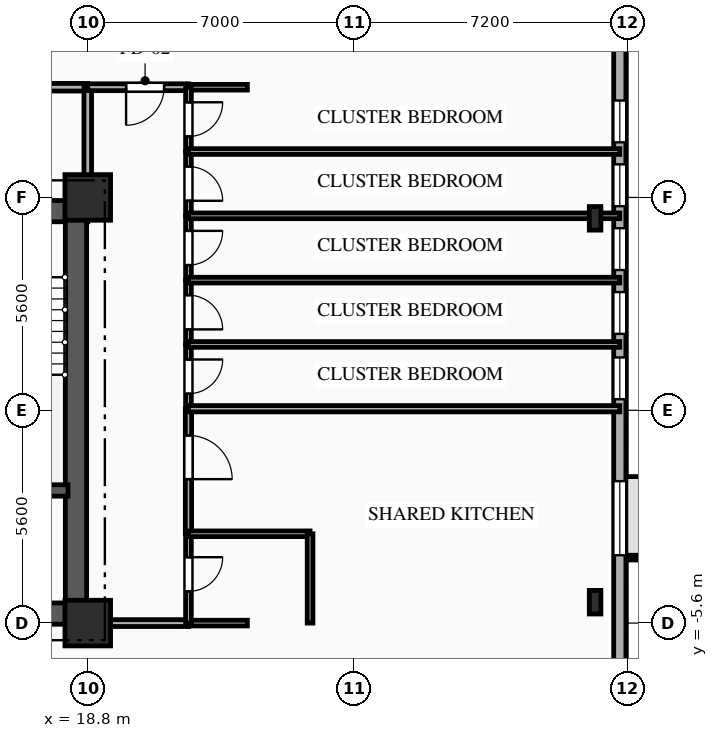
"""IFC4 building model, lengths in metres.
Left out: names, types, materials, properties, quantities, classifications, styles, units other than length and angle.
Written with IfcOpenShell. Run it as: python <this file> out.ifc"""

import sys

from ifc_helpers import new_model, si_unit, direction, frame, frame_2d, origin, origin_2d, place, context, subcontext, project, spatial, rectangle, i_section, extrude, element, fill, save


model = new_model("IFC4")
c1 = context("Model", 3, precision=1e-05, world=origin(), true_north=direction((0.0, 1.0)))
c2 = subcontext(c1, "Body", "Model", "MODEL_VIEW")
j1 = project(units=[si_unit("LENGTHUNIT", "METRE"), si_unit("PLANEANGLEUNIT", "RADIAN")], contexts=[c1])
p1 = place(None, origin())
s1 = spatial("IfcSite", under=j1, at=p1, CompositionType="ELEMENT")
p2 = place(p1, origin())
s2 = spatial("IfcBuilding", under=s1, at=p2, CompositionType="ELEMENT")
p3 = place(p2, frame((0.0, 0.0, 57.15)))
s3 = spatial("IfcBuildingStorey", under=s2, at=p3, CompositionType="ELEMENT", Elevation=57.15)
for number, where, z_axis, x_axis in (
    (1, (18.8, -5.6, 0.0), (0.0, 0.0, 1.0), (1.0, 0.0, 0.0)),
    (2, (18.8, 5.6, 0.0), (0.0, 0.0, 1.0), (1.0, 0.0, 0.0)),
):
    element("IfcColumn", number, at=place(p3, frame(where, z_axis=z_axis, x_axis=x_axis)), inside=s3, PredefinedType="COLUMN", context=c2, shape_type="SweptSolid", body=[
        extrude(rectangle(XDim=1.2, YDim=1.2, at=origin_2d()), origin(), (0.0, 0.0, 1.0), 3.35),
    ])
for number, where, z_axis, x_axis in (
    (3, (32.15, -5.05, 0.0), (0.0, 0.0, 1.0), (1.0, 0.0, 0.0)),
    (4, (32.15, 5.05, 0.0), (0.0, 0.0, 1.0), (1.0, 0.0, 0.0)),
):
    element("IfcColumn", number, at=place(p3, frame(where, z_axis=z_axis, x_axis=x_axis)), inside=s3, PredefinedType="COLUMN", context=c2, shape_type="SweptSolid", body=[
        extrude(i_section(OverallWidth=0.305, OverallDepth=0.62, WebThickness=0.021, FlangeThickness=0.04, FilletRadius=0.027, at=origin_2d()), origin(), (0.0, 0.0, 1.0), 3.35),
    ])
p4 = place(p3, frame((32.8, 15.8, 0.0), z_axis=(0.0, 0.0, 1.0), x_axis=(0.0, -1.0, 0.0)))
e5 = element("IfcWall", 5, at=p4, inside=s3, PredefinedType="SOLIDWALL", context=c2, shape_type="SweptSolid", body=[
    extrude(rectangle(XDim=31.6, YDim=0.32, at=frame_2d((15.8, 0.0))), origin(), (0.0, 0.0, 1.0), 3.035),
])
p5 = place(p4, frame((7.65, 0.0, 0.85)))
e6 = element("IfcOpeningElement", 6, at=p5, cuts=e5, PredefinedType="OPENING", context=c2, shape_type="SweptSolid", body=[
    extrude(rectangle(XDim=1.1, YDim=1.85, at=frame_2d((0.55, 0.925))), frame((0.0, 0.17, 0.0), z_axis=(0.0, -1.0, 0.0), x_axis=(1.0, 0.0, 0.0)), (0.0, 0.0, 1.0), 0.34),
])
p6 = place(p4, frame((9.33, 0.0, 0.85)))
e7 = element("IfcOpeningElement", 7, at=p6, cuts=e5, PredefinedType="OPENING", context=c2, shape_type="SweptSolid", body=[
    extrude(rectangle(XDim=1.1, YDim=1.85, at=frame_2d((0.55, 0.925))), frame((0.0, 0.17, 0.0), z_axis=(0.0, -1.0, 0.0), x_axis=(1.0, 0.0, 0.0)), (0.0, 0.0, 1.0), 0.34),
])
p7 = place(p4, frame((11.01, 0.0, 0.85)))
e8 = element("IfcOpeningElement", 8, at=p7, cuts=e5, PredefinedType="OPENING", context=c2, shape_type="SweptSolid", body=[
    extrude(rectangle(XDim=1.1, YDim=1.85, at=frame_2d((0.55, 0.925))), frame((0.0, 0.17, 0.0), z_axis=(0.0, -1.0, 0.0), x_axis=(1.0, 0.0, 0.0)), (0.0, 0.0, 1.0), 0.34),
])
p8 = place(p4, frame((12.69, 0.0, 0.85)))
e9 = element("IfcOpeningElement", 9, at=p8, cuts=e5, PredefinedType="OPENING", context=c2, shape_type="SweptSolid", body=[
    extrude(rectangle(XDim=1.1, YDim=1.85, at=frame_2d((0.55, 0.925))), frame((0.0, 0.17, 0.0), z_axis=(0.0, -1.0, 0.0), x_axis=(1.0, 0.0, 0.0)), (0.0, 0.0, 1.0), 0.34),
])
p9 = place(p4, frame((14.41, 0.0, 0.85)))
e10 = element("IfcOpeningElement", 10, at=p9, cuts=e5, PredefinedType="OPENING", context=c2, shape_type="SweptSolid", body=[
    extrude(rectangle(XDim=1.1, YDim=1.85, at=frame_2d((0.55, 0.925))), frame((0.0, 0.17, 0.0), z_axis=(0.0, -1.0, 0.0), x_axis=(1.0, 0.0, 0.0)), (0.0, 0.0, 1.0), 0.34),
])
p10 = place(p4, frame((17.665, 0.0, 0.85)))
e11 = element("IfcOpeningElement", 11, at=p10, cuts=e5, PredefinedType="OPENING", context=c2, shape_type="SweptSolid", body=[
    extrude(rectangle(XDim=1.95, YDim=1.85, at=frame_2d((0.975, 0.925))), frame((0.0, 0.17, 0.0), z_axis=(0.0, -1.0, 0.0), x_axis=(1.0, 0.0, 0.0)), (0.0, 0.0, 1.0), 0.34),
])
p11 = place(p3, frame((9.2, 5.24, 0.0), z_axis=(0.0, 0.0, 1.0), x_axis=(1.0, 0.0, 0.0)))
e12 = element("IfcWall", 12, at=p11, inside=s3, PredefinedType="SHEAR", context=c2, shape_type="SweptSolid", body=[
    extrude(rectangle(XDim=9.6, YDim=0.56, at=frame_2d((4.8, 0.0))), origin(), (0.0, 0.0, 1.0), 3.035),
])
p12 = place(p11, frame((6.95, 0.0, 0.0)))
e13 = element("IfcOpeningElement", 13, at=p12, cuts=e12, PredefinedType="OPENING", context=c2, shape_type="SweptSolid", body=[
    extrude(rectangle(XDim=1.1, YDim=2.15, at=frame_2d((0.55, 1.075))), frame((0.0, 0.29, 0.0), z_axis=(0.0, -1.0, 0.0), x_axis=(1.0, 0.0, 0.0)), (0.0, 0.0, 1.0), 0.58),
])
p13 = place(p11, frame((3.775, 0.0, 0.0)))
e14 = element("IfcOpeningElement", 14, at=p13, cuts=e12, PredefinedType="OPENING", context=c2, shape_type="SweptSolid", body=[
    extrude(rectangle(XDim=1.05, YDim=2.1, at=frame_2d((0.525, 1.05))), frame((0.0, 0.29, 0.0), z_axis=(0.0, -1.0, 0.0), x_axis=(1.0, 0.0, 0.0)), (0.0, 0.0, 1.0), 0.58),
])
p14 = place(p3, frame((9.2, -5.35, 0.0), z_axis=(0.0, 0.0, 1.0), x_axis=(1.0, 0.0, 0.0)))
e15 = element("IfcWall", 15, at=p14, inside=s3, PredefinedType="SHEAR", context=c2, shape_type="SweptSolid", body=[
    extrude(rectangle(XDim=9.6, YDim=0.56, at=frame_2d((4.8, 0.0))), origin(), (0.0, 0.0, 1.0), 3.035),
])
p15 = place(p14, frame((7.65, 0.0, 0.0)))
e16 = element("IfcOpeningElement", 16, at=p15, cuts=e15, PredefinedType="OPENING", context=c2, shape_type="SweptSolid", body=[
    extrude(rectangle(XDim=0.9, YDim=2.1, at=frame_2d((0.45, 1.05))), frame((0.0, 0.29, 0.0), z_axis=(0.0, -1.0, 0.0), x_axis=(1.0, 0.0, 0.0)), (0.0, 0.0, 1.0), 0.58),
])
p16 = place(p3, frame((18.49, -5.05, 0.0), z_axis=(0.0, 0.0, 1.0), x_axis=(0.0, 1.0, 0.0)))
e17 = element("IfcWall", 17, at=p16, inside=s3, PredefinedType="SHEAR", context=c2, shape_type="SweptSolid", body=[
    extrude(rectangle(XDim=10.1, YDim=0.56, at=frame_2d((5.05, 0.0))), origin(), (0.0, 0.0, 1.0), 3.035),
])
p17 = place(p3, frame((15.1, -2.11, 0.0), z_axis=(0.0, 0.0, 1.0), x_axis=(1.0, 0.0, 0.0)))
e18 = element("IfcWall", 18, at=p17, inside=s3, PredefinedType="SHEAR", context=c2, shape_type="SweptSolid", body=[
    extrude(rectangle(XDim=3.18, YDim=0.3, at=frame_2d((1.59, 0.0))), origin(), (0.0, 0.0, 1.0), 3.035),
])
p18 = place(p3, frame((18.8, 8.5, 0.0), z_axis=(0.0, 0.0, 1.0), x_axis=(-1.0, 0.0, 0.0)))
e19 = element("IfcWall", 19, at=p18, inside=s3, PredefinedType="PARTITIONING", context=c2, shape_type="SweptSolid", body=[
    extrude(rectangle(XDim=6.8, YDim=0.2, at=frame_2d((3.4, 0.0))), origin(), (0.0, 0.0, 1.0), 3.035),
])
p19 = place(p18, frame((3.985, 0.0, 0.0)))
e20 = element("IfcOpeningElement", 20, at=p19, cuts=e19, PredefinedType="OPENING", context=c2, shape_type="SweptSolid", body=[
    extrude(rectangle(XDim=1.1, YDim=2.15, at=frame_2d((0.55, 1.075))), frame((0.0, 0.11, 0.0), z_axis=(0.0, -1.0, 0.0), x_axis=(1.0, 0.0, 0.0)), (0.0, 0.0, 1.0), 0.22),
])
p20 = place(p3, frame((18.8, 5.6, 0.0), z_axis=(0.0, 0.0, 1.0), x_axis=(0.0, 1.0, 0.0)))
e21 = element("IfcWall", 21, at=p20, inside=s3, PredefinedType="PARTITIONING", context=c2, shape_type="SweptSolid", body=[
    extrude(rectangle(XDim=2.9, YDim=0.2, at=frame_2d((1.45, 0.0))), origin(), (0.0, 0.0, 1.0), 2.52),
])
p21 = place(p3, frame((21.45, 8.5, 0.0), z_axis=(0.0, 0.0, 1.0), x_axis=(-1.0, 0.0, 0.0)))
e22 = element("IfcWall", 22, at=p21, inside=s3, PredefinedType="PARTITIONING", context=c2, shape_type="SweptSolid", body=[
    extrude(rectangle(XDim=2.65, YDim=0.18, at=frame_2d((1.325, 0.0))), origin(), (0.0, 0.0, 1.0), 3.035),
])
p22 = place(p21, frame((0.641, 0.0, 0.0)))
e23 = element("IfcOpeningElement", 23, at=p22, cuts=e22, PredefinedType="OPENING", context=c2, shape_type="SweptSolid", body=[
    extrude(rectangle(XDim=1.0, YDim=2.15, at=frame_2d((0.5, 1.075))), frame((0.0, 0.1, 0.0), z_axis=(0.0, -1.0, 0.0), x_axis=(1.0, 0.0, 0.0)), (0.0, 0.0, 1.0), 0.2),
])
p23 = place(p3, frame((23.0, 8.5, 0.0), z_axis=(0.0, 0.0, 1.0), x_axis=(-1.0, 0.0, 0.0)))
e24 = element("IfcWall", 24, at=p23, inside=s3, PredefinedType="PARTITIONING", context=c2, shape_type="SweptSolid", body=[
    extrude(rectangle(XDim=1.55, YDim=0.15, at=frame_2d((0.775, 0.0))), origin(), (0.0, 0.0, 1.0), 3.035),
])
p24 = place(p3, frame((18.8, -5.6, 0.0), z_axis=(0.0, 0.0, 1.0), x_axis=(1.0, 0.0, 0.0)))
e25 = element("IfcWall", 25, at=p24, inside=s3, PredefinedType="PARTITIONING", context=c2, shape_type="SweptSolid", body=[
    extrude(rectangle(XDim=2.65, YDim=0.18, at=frame_2d((1.325, 0.0))), origin(), (0.0, 0.0, 1.0), 3.035),
])
p25 = place(p3, frame((21.45, -5.6, 0.0), z_axis=(0.0, 0.0, 1.0), x_axis=(1.0, 0.0, 0.0)))
e26 = element("IfcWall", 26, at=p25, inside=s3, PredefinedType="PLUMBINGWALL", context=c2, shape_type="SweptSolid", body=[
    extrude(rectangle(XDim=1.55, YDim=0.15, at=frame_2d((0.775, 0.0))), origin(), (0.0, 0.0, 1.0), 3.035),
])
p26 = place(p3, frame((21.45, -3.25, 0.0), z_axis=(0.0, 0.0, 1.0), x_axis=(0.0, -1.0, 0.0)))
e27 = element("IfcWall", 27, at=p26, inside=s3, PredefinedType="PLUMBINGWALL", context=c2, shape_type="SweptSolid", body=[
    extrude(rectangle(XDim=2.35, YDim=0.15, at=frame_2d((1.175, 0.0))), origin(), (0.0, 0.0, 1.0), 3.035),
])
p27 = place(p26, frame((0.616, 0.0, 0.0)))
e28 = element("IfcOpeningElement", 28, at=p27, cuts=e27, PredefinedType="OPENING", context=c2, shape_type="SweptSolid", body=[
    extrude(rectangle(XDim=0.9, YDim=2.1, at=frame_2d((0.45, 1.05))), frame((0.0, 0.085, 0.0), z_axis=(0.0, -1.0, 0.0), x_axis=(1.0, 0.0, 0.0)), (0.0, 0.0, 1.0), 0.17),
])
p28 = place(p3, frame((21.45, 0.04, 0.0), z_axis=(0.0, 0.0, 1.0), x_axis=(0.0, -1.0, 0.0)))
e29 = element("IfcWall", 29, at=p28, inside=s3, PredefinedType="PARTITIONING", context=c2, shape_type="SweptSolid", body=[
    extrude(rectangle(XDim=3.29, YDim=0.165, at=frame_2d((1.645, 0.0))), origin(), (0.0, 0.0, 1.0), 3.035),
])
p29 = place(p28, frame((0.702, 0.0, 0.0)))
e30 = element("IfcOpeningElement", 30, at=p29, cuts=e29, PredefinedType="OPENING", context=c2, shape_type="SweptSolid", body=[
    extrude(rectangle(XDim=1.15, YDim=2.15, at=frame_2d((0.575, 1.075))), frame((0.0, 0.093, 0.0), z_axis=(0.0, -1.0, 0.0), x_axis=(1.0, 0.0, 0.0)), (0.0, 0.0, 1.0), 0.185),
])
p30 = place(p3, frame((21.45, 1.732, 0.0), z_axis=(0.0, 0.0, 1.0), x_axis=(0.0, -1.0, 0.0)))
e31 = element("IfcWall", 31, at=p30, inside=s3, PredefinedType="PARTITIONING", context=c2, shape_type="SweptSolid", body=[
    extrude(rectangle(XDim=1.692, YDim=0.15, at=frame_2d((0.846, 0.0))), origin(), (0.0, 0.0, 1.0), 3.035),
])
p31 = place(p30, frame((0.396, 0.0, 0.0)))
e32 = element("IfcOpeningElement", 32, at=p31, cuts=e31, PredefinedType="OPENING", context=c2, shape_type="SweptSolid", body=[
    extrude(rectangle(XDim=0.9, YDim=2.1, at=frame_2d((0.45, 1.05))), frame((0.0, 0.085, 0.0), z_axis=(0.0, -1.0, 0.0), x_axis=(1.0, 0.0, 0.0)), (0.0, 0.0, 1.0), 0.17),
])
p32 = place(p3, frame((21.45, 3.424, 0.0), z_axis=(0.0, 0.0, 1.0), x_axis=(0.0, -1.0, 0.0)))
e33 = element("IfcWall", 33, at=p32, inside=s3, PredefinedType="PARTITIONING", context=c2, shape_type="SweptSolid", body=[
    extrude(rectangle(XDim=1.692, YDim=0.15, at=frame_2d((0.846, 0.0))), origin(), (0.0, 0.0, 1.0), 3.035),
])
p33 = place(p32, frame((0.396, 0.0, 0.0)))
e34 = element("IfcOpeningElement", 34, at=p33, cuts=e33, PredefinedType="OPENING", context=c2, shape_type="SweptSolid", body=[
    extrude(rectangle(XDim=0.9, YDim=2.1, at=frame_2d((0.45, 1.05))), frame((0.0, 0.085, 0.0), z_axis=(0.0, -1.0, 0.0), x_axis=(1.0, 0.0, 0.0)), (0.0, 0.0, 1.0), 0.17),
])
p34 = place(p3, frame((21.45, 5.116, 0.0), z_axis=(0.0, 0.0, 1.0), x_axis=(0.0, -1.0, 0.0)))
e35 = element("IfcWall", 35, at=p34, inside=s3, PredefinedType="PARTITIONING", context=c2, shape_type="SweptSolid", body=[
    extrude(rectangle(XDim=1.692, YDim=0.15, at=frame_2d((0.846, 0.0))), origin(), (0.0, 0.0, 1.0), 3.035),
])
p35 = place(p34, frame((0.396, 0.0, 0.0)))
e36 = element("IfcOpeningElement", 36, at=p35, cuts=e35, PredefinedType="OPENING", context=c2, shape_type="SweptSolid", body=[
    extrude(rectangle(XDim=0.9, YDim=2.1, at=frame_2d((0.45, 1.05))), frame((0.0, 0.085, 0.0), z_axis=(0.0, -1.0, 0.0), x_axis=(1.0, 0.0, 0.0)), (0.0, 0.0, 1.0), 0.17),
])
p36 = place(p3, frame((21.45, 6.808, 0.0), z_axis=(0.0, 0.0, 1.0), x_axis=(0.0, -1.0, 0.0)))
e37 = element("IfcWall", 37, at=p36, inside=s3, PredefinedType="PARTITIONING", context=c2, shape_type="SweptSolid", body=[
    extrude(rectangle(XDim=1.692, YDim=0.15, at=frame_2d((0.846, 0.0))), origin(), (0.0, 0.0, 1.0), 3.035),
])
p37 = place(p36, frame((0.396, 0.0, 0.0)))
e38 = element("IfcOpeningElement", 38, at=p37, cuts=e37, PredefinedType="OPENING", context=c2, shape_type="SweptSolid", body=[
    extrude(rectangle(XDim=0.9, YDim=2.1, at=frame_2d((0.45, 1.05))), frame((0.0, 0.085, 0.0), z_axis=(0.0, -1.0, 0.0), x_axis=(1.0, 0.0, 0.0)), (0.0, 0.0, 1.0), 0.17),
])
p38 = place(p3, frame((21.45, 8.5, 0.0), z_axis=(0.0, 0.0, 1.0), x_axis=(0.0, -1.0, 0.0)))
e39 = element("IfcWall", 39, at=p38, inside=s3, PredefinedType="PARTITIONING", context=c2, shape_type="SweptSolid", body=[
    extrude(rectangle(XDim=1.692, YDim=0.15, at=frame_2d((0.846, 0.0))), origin(), (0.0, 0.0, 1.0), 3.035),
])
p39 = place(p38, frame((0.396, 0.0, 0.0)))
e40 = element("IfcOpeningElement", 40, at=p39, cuts=e39, PredefinedType="OPENING", context=c2, shape_type="SweptSolid", body=[
    extrude(rectangle(XDim=0.9, YDim=2.1, at=frame_2d((0.45, 1.05))), frame((0.0, 0.085, 0.0), z_axis=(0.0, -1.0, 0.0), x_axis=(1.0, 0.0, 0.0)), (0.0, 0.0, 1.0), 0.17),
])
p40 = place(p3, frame((21.45, -3.25, 0.0), z_axis=(0.0, 0.0, 1.0), x_axis=(1.0, 0.0, 0.0)))
e41 = element("IfcWall", 41, at=p40, inside=s3, PredefinedType="PLUMBINGWALL", context=c2, shape_type="SweptSolid", body=[
    extrude(rectangle(XDim=3.2, YDim=0.15, at=frame_2d((1.6, 0.0))), origin(), (0.0, 0.0, 1.0), 2.52),
])
p41 = place(p3, frame((24.65, -3.25, 0.0), z_axis=(0.0, 0.0, 1.0), x_axis=(0.0, -1.0, 0.0)))
e42 = element("IfcWall", 42, at=p41, inside=s3, PredefinedType="PLUMBINGWALL", context=c2, shape_type="SweptSolid", body=[
    extrude(rectangle(XDim=2.35, YDim=0.15, at=frame_2d((1.175, 0.0))), origin(), (0.0, 0.0, 1.0), 3.035),
])
p42 = place(p3, frame((21.45, 0.04, 0.0), z_axis=(0.0, 0.0, 1.0), x_axis=(1.0, 0.0, 0.0)))
e43 = element("IfcWall", 43, at=p42, inside=s3, PredefinedType="PARTITIONING", context=c2, shape_type="SweptSolid", body=[
    extrude(rectangle(XDim=11.35, YDim=0.165, at=frame_2d((5.675, 0.0))), origin(), (0.0, 0.0, 1.0), 3.035),
])
p43 = place(p3, frame((21.45, 1.732, 0.0), z_axis=(0.0, 0.0, 1.0), x_axis=(1.0, 0.0, 0.0)))
e44 = element("IfcWall", 44, at=p43, inside=s3, PredefinedType="PARTITIONING", context=c2, shape_type="SweptSolid", body=[
    extrude(rectangle(XDim=11.35, YDim=0.15, at=frame_2d((5.675, 0.0))), origin(), (0.0, 0.0, 1.0), 3.035),
])
for number, where, z_axis, x_axis in (
    (45, (21.45, 3.424, 0.0), (0.0, 0.0, 1.0), (1.0, 0.0, 0.0)),
    (46, (21.45, 5.116, 0.0), (0.0, 0.0, 1.0), (1.0, 0.0, 0.0)),
):
    element("IfcWall", number, at=place(p3, frame(where, z_axis=z_axis, x_axis=x_axis)), inside=s3, PredefinedType="PARTITIONING", context=c2, shape_type="SweptSolid", body=[
        extrude(rectangle(XDim=11.35, YDim=0.15, at=frame_2d((5.675, 0.0))), origin(), (0.0, 0.0, 1.0), 2.52),
    ])
p44 = place(p3, frame((21.45, 6.808, 0.0), z_axis=(0.0, 0.0, 1.0), x_axis=(1.0, 0.0, 0.0)))
e47 = element("IfcWall", 47, at=p44, inside=s3, PredefinedType="PARTITIONING", context=c2, shape_type="SweptSolid", body=[
    extrude(rectangle(XDim=11.35, YDim=0.15, at=frame_2d((5.675, 0.0))), origin(), (0.0, 0.0, 1.0), 3.035),
])
p45 = place(p5, origin())
e48 = element("IfcWindow", 48, at=p45, inside=s3, PartitioningType="SINGLE_PANEL", PredefinedType="WINDOW", context=c2, shape_type="SweptSolid", body=[
    extrude(rectangle(XDim=1.1, YDim=1.85, at=frame_2d((0.55, 0.925))), frame((0.0, 0.03, 0.0), z_axis=(0.0, -1.0, 0.0), x_axis=(1.0, 0.0, 0.0)), (0.0, 0.0, 1.0), 0.06),
])
fill(e6, e48)
p46 = place(p6, origin())
e49 = element("IfcWindow", 49, at=p46, inside=s3, PartitioningType="SINGLE_PANEL", PredefinedType="WINDOW", context=c2, shape_type="SweptSolid", body=[
    extrude(rectangle(XDim=1.1, YDim=1.85, at=frame_2d((0.55, 0.925))), frame((0.0, 0.03, 0.0), z_axis=(0.0, -1.0, 0.0), x_axis=(1.0, 0.0, 0.0)), (0.0, 0.0, 1.0), 0.06),
])
fill(e7, e49)
p47 = place(p7, origin())
e50 = element("IfcWindow", 50, at=p47, inside=s3, PartitioningType="SINGLE_PANEL", PredefinedType="WINDOW", context=c2, shape_type="SweptSolid", body=[
    extrude(rectangle(XDim=1.1, YDim=1.85, at=frame_2d((0.55, 0.925))), frame((0.0, 0.03, 0.0), z_axis=(0.0, -1.0, 0.0), x_axis=(1.0, 0.0, 0.0)), (0.0, 0.0, 1.0), 0.06),
])
fill(e8, e50)
p48 = place(p8, origin())
e51 = element("IfcWindow", 51, at=p48, inside=s3, PartitioningType="SINGLE_PANEL", PredefinedType="WINDOW", context=c2, shape_type="SweptSolid", body=[
    extrude(rectangle(XDim=1.1, YDim=1.85, at=frame_2d((0.55, 0.925))), frame((0.0, 0.03, 0.0), z_axis=(0.0, -1.0, 0.0), x_axis=(1.0, 0.0, 0.0)), (0.0, 0.0, 1.0), 0.06),
])
fill(e9, e51)
p49 = place(p9, origin())
e52 = element("IfcWindow", 52, at=p49, inside=s3, PartitioningType="SINGLE_PANEL", PredefinedType="WINDOW", context=c2, shape_type="SweptSolid", body=[
    extrude(rectangle(XDim=1.1, YDim=1.85, at=frame_2d((0.55, 0.925))), frame((0.0, 0.03, 0.0), z_axis=(0.0, -1.0, 0.0), x_axis=(1.0, 0.0, 0.0)), (0.0, 0.0, 1.0), 0.06),
])
fill(e10, e52)
p50 = place(p10, origin())
e53 = element("IfcWindow", 53, at=p50, inside=s3, PartitioningType="SINGLE_PANEL", PredefinedType="WINDOW", context=c2, shape_type="SweptSolid", body=[
    extrude(rectangle(XDim=1.95, YDim=1.85, at=frame_2d((0.975, 0.925))), frame((0.0, 0.03, 0.0), z_axis=(0.0, -1.0, 0.0), x_axis=(1.0, 0.0, 0.0)), (0.0, 0.0, 1.0), 0.06),
])
fill(e11, e53)
p51 = place(p22, origin())
e54 = element("IfcDoor", 54, at=p51, inside=s3, OperationType="SINGLE_SWING_RIGHT", PredefinedType="DOOR", context=c2, shape_type="SweptSolid", body=[
    extrude(rectangle(XDim=1.0, YDim=2.15, at=frame_2d((0.5, 1.075))), frame((0.0, 0.025, 0.0), z_axis=(0.0, -1.0, 0.0), x_axis=(1.0, 0.0, 0.0)), (0.0, 0.0, 1.0), 0.05),
])
fill(e23, e54)
p52 = place(p27, origin())
e55 = element("IfcDoor", 55, at=p52, inside=s3, OperationType="SINGLE_SWING_LEFT", PredefinedType="DOOR", context=c2, shape_type="SweptSolid", body=[
    extrude(rectangle(XDim=0.9, YDim=2.1, at=frame_2d((0.45, 1.05))), frame((0.0, 0.025, 0.0), z_axis=(0.0, -1.0, 0.0), x_axis=(1.0, 0.0, 0.0)), (0.0, 0.0, 1.0), 0.05),
])
fill(e28, e55)
p53 = place(p29, origin())
e56 = element("IfcDoor", 56, at=p53, inside=s3, OperationType="SINGLE_SWING_RIGHT", PredefinedType="DOOR", context=c2, shape_type="SweptSolid", body=[
    extrude(rectangle(XDim=1.15, YDim=2.15, at=frame_2d((0.575, 1.075))), frame((0.0, 0.025, 0.0), z_axis=(0.0, -1.0, 0.0), x_axis=(1.0, 0.0, 0.0)), (0.0, 0.0, 1.0), 0.05),
])
fill(e30, e56)
p54 = place(p31, origin())
e57 = element("IfcDoor", 57, at=p54, inside=s3, OperationType="SINGLE_SWING_LEFT", PredefinedType="DOOR", context=c2, shape_type="SweptSolid", body=[
    extrude(rectangle(XDim=0.9, YDim=2.1, at=frame_2d((0.45, 1.05))), frame((0.0, 0.025, 0.0), z_axis=(0.0, -1.0, 0.0), x_axis=(1.0, 0.0, 0.0)), (0.0, 0.0, 1.0), 0.05),
])
fill(e32, e57)
p55 = place(p33, origin())
e58 = element("IfcDoor", 58, at=p55, inside=s3, OperationType="SINGLE_SWING_RIGHT", PredefinedType="DOOR", context=c2, shape_type="SweptSolid", body=[
    extrude(rectangle(XDim=0.9, YDim=2.1, at=frame_2d((0.45, 1.05))), frame((0.0, 0.025, 0.0), z_axis=(0.0, -1.0, 0.0), x_axis=(1.0, 0.0, 0.0)), (0.0, 0.0, 1.0), 0.05),
])
fill(e34, e58)
p56 = place(p35, origin())
e59 = element("IfcDoor", 59, at=p56, inside=s3, OperationType="SINGLE_SWING_LEFT", PredefinedType="DOOR", context=c2, shape_type="SweptSolid", body=[
    extrude(rectangle(XDim=0.9, YDim=2.1, at=frame_2d((0.45, 1.05))), frame((0.0, 0.025, 0.0), z_axis=(0.0, -1.0, 0.0), x_axis=(1.0, 0.0, 0.0)), (0.0, 0.0, 1.0), 0.05),
])
fill(e36, e59)
p57 = place(p37, origin())
e60 = element("IfcDoor", 60, at=p57, inside=s3, OperationType="SINGLE_SWING_RIGHT", PredefinedType="DOOR", context=c2, shape_type="SweptSolid", body=[
    extrude(rectangle(XDim=0.9, YDim=2.1, at=frame_2d((0.45, 1.05))), frame((0.0, 0.025, 0.0), z_axis=(0.0, -1.0, 0.0), x_axis=(1.0, 0.0, 0.0)), (0.0, 0.0, 1.0), 0.05),
])
fill(e38, e60)
p58 = place(p39, origin())
e61 = element("IfcDoor", 61, at=p58, inside=s3, OperationType="SINGLE_SWING_LEFT", PredefinedType="DOOR", context=c2, shape_type="SweptSolid", body=[
    extrude(rectangle(XDim=0.9, YDim=2.1, at=frame_2d((0.45, 1.05))), frame((0.0, 0.025, 0.0), z_axis=(0.0, -1.0, 0.0), x_axis=(1.0, 0.0, 0.0)), (0.0, 0.0, 1.0), 0.05),
])
fill(e40, e61)
save(model, sys.argv[1])
